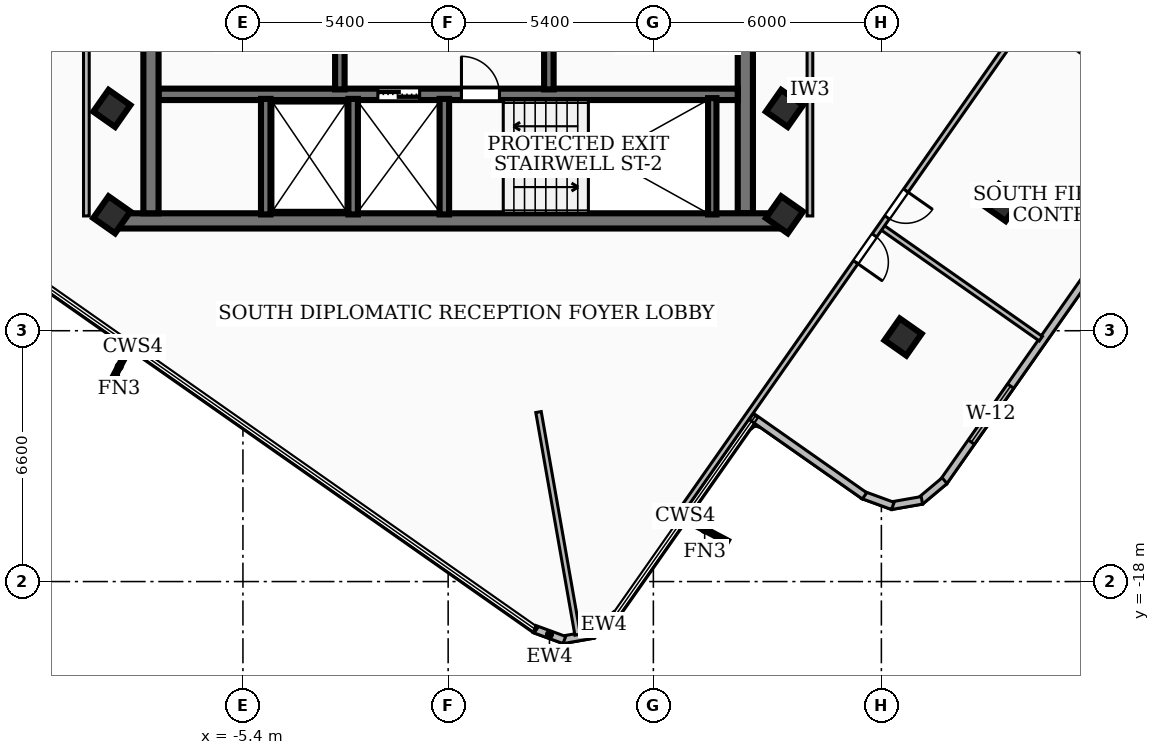
"""IFC4 building model, lengths in metres.
Left out: names, types, materials, properties, quantities, classifications, styles, units other than length and angle.
Written with IfcOpenShell. Run it as: python <this file> out.ifc"""

import sys

from ifc_helpers import new_model, si_unit, direction, frame, frame_2d, origin, origin_2d, place, context, subcontext, project, spatial, rectangle, extrude, element, fill, save


model = new_model("IFC4")
c1 = context("Model", 3, precision=1e-05, world=origin(), true_north=direction((0.0, 1.0)))
c2 = subcontext(c1, "Body", "Model", "MODEL_VIEW")
j1 = project(units=[si_unit("LENGTHUNIT", "METRE"), si_unit("PLANEANGLEUNIT", "RADIAN")], contexts=[c1])
p1 = place(None, origin())
s1 = spatial("IfcSite", under=j1, at=p1, CompositionType="ELEMENT")
p2 = place(p1, origin())
s2 = spatial("IfcBuilding", under=s1, at=p2, CompositionType="ELEMENT")
p3 = place(p2, frame((0.0, 0.0, 264.6)))
s3 = spatial("IfcBuildingStorey", under=s2, at=p3, CompositionType="ELEMENT", Elevation=264.6)
p4 = place(p3, frame((8.78, -8.51, 0.0), z_axis=(0.0, 0.0, 1.0), x_axis=(-1.0, 0.0, 0.0)))
e1 = element("IfcWall", 1, at=p4, inside=s3, PredefinedType="SHEAR", context=c2, shape_type="SweptSolid", body=[
    extrude(rectangle(XDim=17.56, YDim=0.4, at=frame_2d((8.78, 0.0))), origin(), (0.0, 0.0, 1.0), 3.16),
])
for number, where, z_axis, x_axis in (
    (2, (-7.82, -8.31, 0.0), (0.0, 0.0, 1.0), (0.0, 1.0, 0.0)),
    (3, (7.82, -1.95, 0.0), (0.0, 0.0, 1.0), (0.0, -1.0, 0.0)),
):
    element("IfcWall", number, at=place(p3, frame(where, z_axis=z_axis, x_axis=x_axis)), inside=s3, PredefinedType="SHEAR", context=c2, shape_type="SweptSolid", body=[
        extrude(rectangle(XDim=6.36, YDim=0.4, at=frame_2d((3.18, 0.0))), origin(), (0.0, 0.0, 1.0), 3.16),
    ])
p5 = place(p3, frame((-7.62, -5.18, 0.0), z_axis=(0.0, 0.0, 1.0), x_axis=(1.0, 0.0, 0.0)))
e4 = element("IfcWall", 4, at=p5, inside=s3, PredefinedType="SOLIDWALL", context=c2, shape_type="SweptSolid", body=[
    extrude(rectangle(XDim=15.24, YDim=0.3, at=frame_2d((7.62, 0.0))), origin(), (0.0, 0.0, 1.0), 3.16),
])
p6 = place(p5, frame((5.77, 0.0, 0.0)))
e5 = element("IfcOpeningElement", 5, at=p6, cuts=e4, PredefinedType="OPENING", context=c2, shape_type="SweptSolid", body=[
    extrude(rectangle(XDim=1.1, YDim=2.15, at=frame_2d((0.55, 1.075))), frame((0.0, 0.16, 0.0), z_axis=(0.0, -1.0, 0.0), x_axis=(1.0, 0.0, 0.0)), (0.0, 0.0, 1.0), 0.32),
])
p7 = place(p5, frame((7.97, 0.0, 0.0)))
e6 = element("IfcOpeningElement", 6, at=p7, cuts=e4, PredefinedType="OPENING", context=c2, shape_type="SweptSolid", body=[
    extrude(rectangle(XDim=1.0, YDim=2.1, at=frame_2d((0.5, 1.05))), frame((0.0, 0.16, 0.0), z_axis=(0.0, -1.0, 0.0), x_axis=(1.0, 0.0, 0.0)), (0.0, 0.0, 1.0), 0.32),
])
p8 = place(p3, frame((6.95, -8.34, 0.0), z_axis=(0.0, 0.0, 1.0), x_axis=(0.0, 1.0, 0.0)))
e7 = element("IfcWall", 7, at=p8, inside=s3, PredefinedType="SOLIDWALL", context=c2, shape_type="SweptSolid", body=[
    extrude(rectangle(XDim=3.06, YDim=0.22, at=frame_2d((1.53, 0.0))), origin(), (0.0, 0.0, 1.0), 3.16),
])
for number, where, z_axis, x_axis in (
    (8, (-0.1, -8.34, 0.0), (0.0, 0.0, 1.0), (0.0, 1.0, 0.0)),
    (9, (-2.5, -8.34, 0.0), (0.0, 0.0, 1.0), (0.0, 1.0, 0.0)),
    (10, (-4.8, -8.34, 0.0), (0.0, 0.0, 1.0), (0.0, 1.0, 0.0)),
):
    element("IfcWall", number, at=place(p3, frame(where, z_axis=z_axis, x_axis=x_axis)), inside=s3, PredefinedType="SOLIDWALL", context=c2, shape_type="SweptSolid", body=[
        extrude(rectangle(XDim=3.04, YDim=0.25, at=frame_2d((1.52, 0.0))), origin(), (0.0, 0.0, 1.0), 3.16),
    ])
for number, where, z_axis, x_axis in (
    (11, (-2.85, -5.05, 0.0), (0.0, 0.0, 1.0), (0.0, 1.0, 0.0)),
    (12, (2.65, -5.05, 0.0), (0.0, 0.0, 1.0), (0.0, 1.0, 0.0)),
):
    element("IfcWall", number, at=place(p3, frame(where, z_axis=z_axis, x_axis=x_axis)), inside=s3, PredefinedType="SOLIDWALL", context=c2, shape_type="SweptSolid", body=[
        extrude(rectangle(XDim=3.07, YDim=0.25, at=frame_2d((1.535, 0.0))), origin(), (0.0, 0.0, 1.0), 3.16),
    ])
for number, where, z_axis, x_axis in (
    (13, (-8.85, -5.55, 0.0), (0.0, 0.0, 1.0), (0.574, 0.819, 0.0)),
    (14, (8.85, -5.55, 0.0), (0.0, 0.0, 1.0), (0.574, 0.819, 0.0)),
    (15, (8.85, -8.35, 0.0), (0.0, 0.0, 1.0), (0.574, 0.819, 0.0)),
    (16, (-8.85, -8.35, 0.0), (0.0, 0.0, 1.0), (0.574, 0.819, 0.0)),
    (17, (11.971, -11.566, 0.0), (0.0, 0.0, 1.0), (0.574, 0.819, 0.0)),
    (18, (14.583, -8.026, 0.0), (0.0, 0.0, 1.0), (0.574, 0.819, 0.0)),
):
    element("IfcColumn", number, at=place(p3, frame(where, z_axis=z_axis, x_axis=x_axis)), inside=s3, PredefinedType="COLUMN", context=c2, shape_type="SweptSolid", body=[
        extrude(rectangle(XDim=0.7, YDim=0.7, at=origin_2d()), origin(), (0.0, 0.0, 1.0), 3.42),
    ])
p9 = place(p3, frame((4.422, -18.872, 0.0), z_axis=(0.0, 0.0, 1.0), x_axis=(-0.766020352528, -0.642816318642, 0.0)))
e19 = element("IfcWall", 19, at=p9, inside=s3, PredefinedType="SOLIDWALL", context=c2, shape_type="SweptSolid", body=[
    extrude(rectangle(XDim=0.838, YDim=0.2, at=frame_2d((0.419, 0.0))), origin(), (0.0, 0.0, 1.0), 3.16),
])
p10 = place(p3, frame((3.824, -19.391, 0.0), z_axis=(0.0, 0.0, 1.0), x_axis=(-0.985118245285, -0.171877988141, 0.0)))
e20 = element("IfcWall", 20, at=p10, inside=s3, PredefinedType="SOLIDWALL", context=c2, shape_type="SweptSolid", body=[
    extrude(rectangle(XDim=0.825, YDim=0.2, at=frame_2d((0.413, 0.0))), origin(), (0.0, 0.0, 1.0), 3.16),
])
p11 = place(p3, frame((3.059, -19.538, 0.0), z_axis=(0.0, 0.0, 1.0), x_axis=(-0.938939131905, 0.344083284363, 0.0)))
e21 = element("IfcWall", 21, at=p11, inside=s3, PredefinedType="SOLIDWALL", context=c2, shape_type="SweptSolid", body=[
    extrude(rectangle(XDim=0.837, YDim=0.2, at=frame_2d((0.418, 0.0))), origin(), (0.0, 0.0, 1.0), 3.16),
])
p12 = place(p3, frame((15.383, -3.092, 0.0), z_axis=(0.0, 0.0, 1.0), x_axis=(0.818664531158, -0.574272048269, 0.0)))
e22 = element("IfcWall", 22, at=p12, inside=s3, PredefinedType="SOLIDWALL", context=c2, shape_type="SweptSolid", body=[
    extrude(rectangle(XDim=3.641, YDim=0.2, at=frame_2d((1.821, 0.0))), origin(), (0.0, 0.0, 1.0), 3.16),
])
p13 = place(p3, frame((18.728, -7.257, 0.0), z_axis=(0.0, 0.0, 1.0), x_axis=(-0.574152395536, -0.818748451419, 0.0)))
e23 = element("IfcWall", 23, at=p13, inside=s3, PredefinedType="SOLIDWALL", context=c2, shape_type="SweptSolid", body=[
    extrude(rectangle(XDim=9.923, YDim=0.2, at=frame_2d((4.961, 0.0))), origin(), (0.0, 0.0, 1.0), 3.16),
])
p14 = place(p13, frame((6.84, 0.0, 0.85)))
e24 = element("IfcOpeningElement", 24, at=p14, cuts=e23, PredefinedType="OPENING", context=c2, shape_type="SweptSolid", body=[
    extrude(rectangle(XDim=1.8, YDim=1.6, at=frame_2d((0.9, 0.8))), frame((0.0, 0.11, 0.0), z_axis=(0.0, -1.0, 0.0), x_axis=(1.0, 0.0, 0.0)), (0.0, 0.0, 1.0), 0.22),
])
p15 = place(p3, frame((13.064, -15.345, 0.0), z_axis=(0.0, 0.0, 1.0), x_axis=(-0.766330415365, -0.642446647191, 0.0)))
e25 = element("IfcWall", 25, at=p15, inside=s3, PredefinedType="SOLIDWALL", context=c2, shape_type="SweptSolid", body=[
    extrude(rectangle(XDim=0.838, YDim=0.2, at=frame_2d((0.419, 0.0))), origin(), (0.0, 0.0, 1.0), 3.16),
])
p16 = place(p3, frame((12.466, -15.863, 0.0), z_axis=(0.0, 0.0, 1.0), x_axis=(-0.985118245285, -0.171877988141, 0.0)))
e26 = element("IfcWall", 26, at=p16, inside=s3, PredefinedType="SOLIDWALL", context=c2, shape_type="SweptSolid", body=[
    extrude(rectangle(XDim=0.825, YDim=0.2, at=frame_2d((0.413, 0.0))), origin(), (0.0, 0.0, 1.0), 3.16),
])
p17 = place(p3, frame((11.701, -16.01, 0.0), z_axis=(0.0, 0.0, 1.0), x_axis=(-0.939042573482, 0.343800880145, 0.0)))
e27 = element("IfcWall", 27, at=p17, inside=s3, PredefinedType="SOLIDWALL", context=c2, shape_type="SweptSolid", body=[
    extrude(rectangle(XDim=0.838, YDim=0.2, at=frame_2d((0.419, 0.0))), origin(), (0.0, 0.0, 1.0), 3.16),
])
p18 = place(p3, frame((10.957, -15.745, 0.0), z_axis=(0.0, 0.0, 1.0), x_axis=(-0.818576054501, 0.574398157202, 0.0)))
e28 = element("IfcWall", 28, at=p18, inside=s3, PredefinedType="SOLIDWALL", context=c2, shape_type="SweptSolid", body=[
    extrude(rectangle(XDim=3.64, YDim=0.2, at=frame_2d((1.82, 0.0))), origin(), (0.0, 0.0, 1.0), 3.16),
])
p19 = place(p3, frame((-9.52, -8.38, 0.0), z_axis=(0.0, 0.0, 1.0), x_axis=(0.0, 1.0, 0.0)))
e29 = element("IfcWall", 29, at=p19, inside=s3, PredefinedType="PARTITIONING", context=c2, shape_type="SweptSolid", body=[
    extrude(rectangle(XDim=6.63, YDim=0.15, at=frame_2d((3.315, 0.0))), origin(), (0.0, 0.0, 1.0), 3.16),
])
p20 = place(p3, frame((9.52, -8.38, 0.0), z_axis=(0.0, 0.0, 1.0), x_axis=(0.0, 1.0, 0.0)))
e30 = element("IfcWall", 30, at=p20, inside=s3, PredefinedType="PARTITIONING", context=c2, shape_type="SweptSolid", body=[
    extrude(rectangle(XDim=6.63, YDim=0.15, at=frame_2d((3.315, 0.0))), origin(), (0.0, 0.0, 1.0), 2.53),
])
p21 = place(p3, frame((2.378, -13.54, 0.0), z_axis=(0.0, 0.0, 1.0), x_axis=(0.173019547247, -0.984918390665, 0.0)))
e31 = element("IfcWall", 31, at=p21, inside=s3, PredefinedType="PARTITIONING", context=c2, shape_type="SweptSolid", body=[
    extrude(rectangle(XDim=5.948, YDim=0.145, at=frame_2d((2.974, 0.0))), origin(), (0.0, 0.0, 1.0), 3.16),
])
p22 = place(p3, frame((11.433, -8.689, 0.0), z_axis=(0.0, 0.0, 1.0), x_axis=(0.81868341552, -0.574245126363, 0.0)))
e32 = element("IfcWall", 32, at=p22, inside=s3, PredefinedType="PARTITIONING", context=c2, shape_type="SweptSolid", body=[
    extrude(rectangle(XDim=5.085, YDim=0.145, at=frame_2d((2.542, 0.0))), origin(), (0.0, 0.0, 1.0), 3.16),
])
p23 = place(p3, frame((17.625, 0.245, 0.0), z_axis=(0.0, 0.0, 1.0), x_axis=(-0.574126736534, -0.818766444352, 0.0)))
e33 = element("IfcWall", 33, at=p23, inside=s3, PredefinedType="PARTITIONING", context=c2, shape_type="SweptSolid", body=[
    extrude(rectangle(XDim=20.34, YDim=0.145, at=frame_2d((10.17, 0.0))), origin(), (0.0, 0.0, 1.0), 2.53),
])
p24 = place(p23, frame((11.16, 0.0, 0.0)))
e34 = element("IfcOpeningElement", 34, at=p24, cuts=e33, PredefinedType="OPENING", context=c2, shape_type="SweptSolid", body=[
    extrude(rectangle(XDim=0.86, YDim=2.04, at=frame_2d((0.43, 1.02))), frame((0.0, 0.083, 0.0), z_axis=(0.0, -1.0, 0.0), x_axis=(1.0, 0.0, 0.0)), (0.0, 0.0, 1.0), 0.165),
])
p25 = place(p23, frame((9.72, 0.0, 0.0)))
e35 = element("IfcOpeningElement", 35, at=p25, cuts=e33, PredefinedType="OPENING", context=c2, shape_type="SweptSolid", body=[
    extrude(rectangle(XDim=0.86, YDim=2.04, at=frame_2d((0.43, 1.02))), frame((0.0, 0.083, 0.0), z_axis=(0.0, -1.0, 0.0), x_axis=(1.0, 0.0, 0.0)), (0.0, 0.0, 1.0), 0.165),
])
p26 = place(p14, origin())
e36 = element("IfcWindow", 36, at=p26, inside=s3, PartitioningType="SINGLE_PANEL", PredefinedType="WINDOW", context=c2, shape_type="SweptSolid", body=[
    extrude(rectangle(XDim=1.8, YDim=1.6, at=frame_2d((0.9, 0.8))), frame((0.0, 0.03, 0.0), z_axis=(0.0, -1.0, 0.0), x_axis=(1.0, 0.0, 0.0)), (0.0, 0.0, 1.0), 0.06),
])
fill(e24, e36)
p27 = place(p6, origin())
e37 = element("IfcDoor", 37, at=p27, inside=s3, OperationType="DOUBLE_DOOR_SLIDING", PredefinedType="DOOR", context=c2, shape_type="SweptSolid", body=[
    extrude(rectangle(XDim=1.1, YDim=2.15, at=frame_2d((0.55, 1.075))), frame((0.0, 0.025, 0.0), z_axis=(0.0, -1.0, 0.0), x_axis=(1.0, 0.0, 0.0)), (0.0, 0.0, 1.0), 0.05),
])
fill(e5, e37)
p28 = place(p7, origin())
e38 = element("IfcDoor", 38, at=p28, inside=s3, OperationType="SINGLE_SWING_LEFT", PredefinedType="DOOR", context=c2, shape_type="SweptSolid", body=[
    extrude(rectangle(XDim=1.0, YDim=2.1, at=frame_2d((0.5, 1.05))), frame((0.0, 0.025, 0.0), z_axis=(0.0, -1.0, 0.0), x_axis=(1.0, 0.0, 0.0)), (0.0, 0.0, 1.0), 0.05),
])
fill(e6, e38)
p29 = place(p24, origin())
e39 = element("IfcDoor", 39, at=p29, inside=s3, OperationType="SINGLE_SWING_RIGHT", PredefinedType="DOOR", context=c2, shape_type="SweptSolid", body=[
    extrude(rectangle(XDim=0.86, YDim=2.04, at=frame_2d((0.43, 1.02))), frame((0.0, 0.025, 0.0), z_axis=(0.0, -1.0, 0.0), x_axis=(1.0, 0.0, 0.0)), (0.0, 0.0, 1.0), 0.05),
])
fill(e34, e39)
p30 = place(p25, origin())
e40 = element("IfcDoor", 40, at=p30, inside=s3, OperationType="SINGLE_SWING_LEFT", PredefinedType="DOOR", context=c2, shape_type="SweptSolid", body=[
    extrude(rectangle(XDim=0.86, YDim=2.04, at=frame_2d((0.43, 1.02))), frame((0.0, 0.025, 0.0), z_axis=(0.0, -1.0, 0.0), x_axis=(1.0, 0.0, 0.0)), (0.0, 0.0, 1.0), 0.05),
])
fill(e35, e40)
save(model, sys.argv[1])
